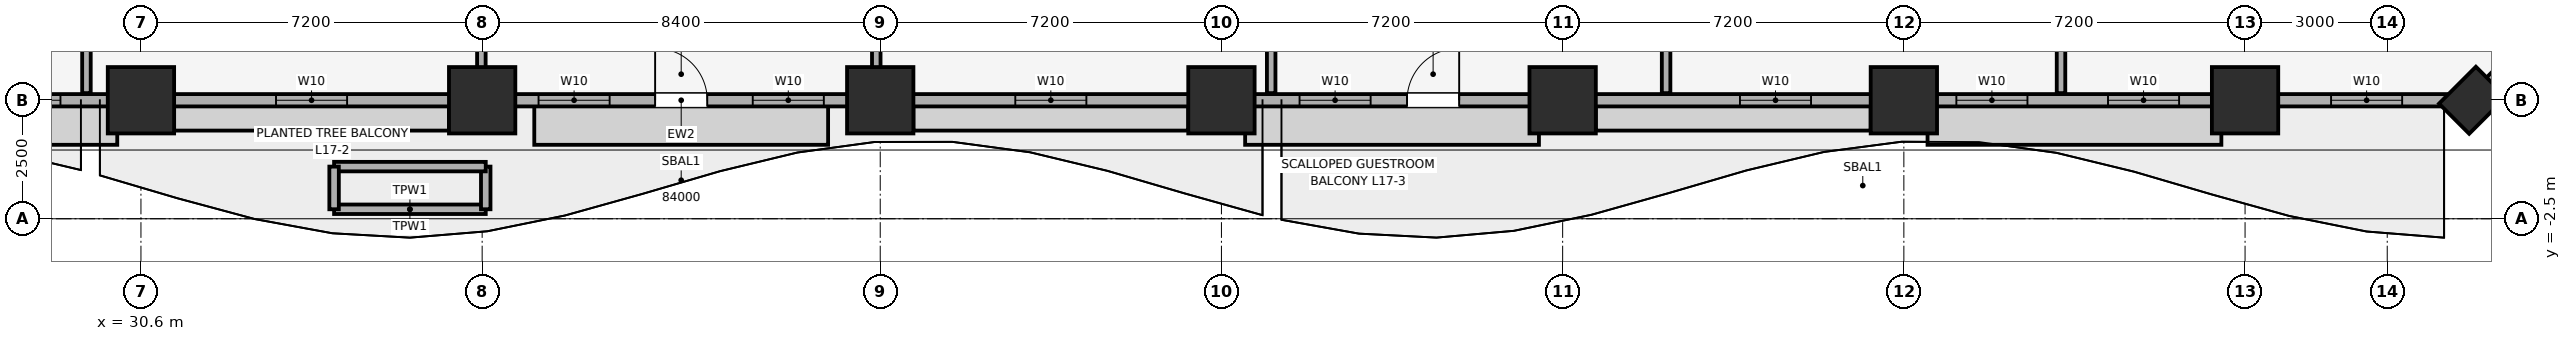
"""IFC4 building model, lengths in metres.
Left out: names, types, materials, properties, quantities, classifications, styles, units other than length and angle.
Written with IfcOpenShell. Run it as: python <this file> out.ifc"""

import sys

from ifc_helpers import new_model, si_unit, direction, frame, frame_2d, origin, origin_2d, place, context, subcontext, project, spatial, rectangle, extrude, element, fill, save


model = new_model("IFC4")
c1 = context("Model", 3, precision=1e-05, world=origin(), true_north=direction((0.0, 1.0)))
c2 = subcontext(c1, "Body", "Model", "MODEL_VIEW")
j1 = project(units=[si_unit("LENGTHUNIT", "METRE"), si_unit("PLANEANGLEUNIT", "RADIAN")], contexts=[c1])
p1 = place(None, origin())
s1 = spatial("IfcSite", under=j1, at=p1, CompositionType="ELEMENT")
p2 = place(p1, origin())
s2 = spatial("IfcBuilding", under=s1, at=p2, CompositionType="ELEMENT")
p3 = place(p2, frame((0.0, 0.0, 76.4)))
s3 = spatial("IfcBuildingStorey", under=s2, at=p3, CompositionType="ELEMENT", Elevation=76.4)
for number, where, z_axis, x_axis in (
    (1, (30.6, 0.0, 0.0), (0.0, 0.0, 1.0), (1.0, 0.0, 0.0)),
    (2, (37.8, 0.0, 0.0), (0.0, 0.0, 1.0), (1.0, 0.0, 0.0)),
    (3, (46.2, 0.0, 0.0), (0.0, 0.0, 1.0), (1.0, 0.0, 0.0)),
    (4, (53.4, 0.0, 0.0), (0.0, 0.0, 1.0), (1.0, 0.0, 0.0)),
    (5, (60.6, 0.0, 0.0), (0.0, 0.0, 1.0), (1.0, 0.0, 0.0)),
    (6, (67.8, 0.0, 0.0), (0.0, 0.0, 1.0), (1.0, 0.0, 0.0)),
    (7, (75.0, 0.0, 0.0), (0.0, 0.0, 1.0), (1.0, 0.0, 0.0)),
):
    element("IfcColumn", number, at=place(p3, frame(where, z_axis=z_axis, x_axis=x_axis)), inside=s3, PredefinedType="COLUMN", context=c2, shape_type="SweptSolid", body=[
        extrude(rectangle(XDim=1.4, YDim=1.4, at=origin_2d()), origin(), (0.0, 0.0, 1.0), 3.4),
    ])
p4 = place(p3, frame((79.8, 0.0, 0.0), z_axis=(0.0, 0.0, 1.0), x_axis=(0.707106781187, 0.707106781187, 0.0)))
e8 = element("IfcColumn", 8, at=p4, inside=s3, PredefinedType="PILASTER", context=c2, shape_type="SweptSolid", body=[
    extrude(rectangle(XDim=1.1, YDim=0.9, at=origin_2d()), origin(), (0.0, 0.0, 1.0), 3.4),
])
p5 = place(p3, frame((4.2, 0.0, 0.0), z_axis=(0.0, 0.0, 1.0), x_axis=(1.0, 0.0, 0.0)))
e9 = element("IfcWall", 9, at=p5, inside=s3, PredefinedType="SOLIDWALL", context=c2, shape_type="SweptSolid", body=[
    extrude(rectangle(XDim=75.6, YDim=0.26, at=frame_2d((37.8, 0.0))), origin(), (0.0, 0.0, 1.0), 2.45),
])
p6 = place(p5, frame((21.383, 0.0, 0.0)))
e10 = element("IfcOpeningElement", 10, at=p6, cuts=e9, PredefinedType="OPENING", context=c2, shape_type="SweptSolid", body=[
    extrude(rectangle(XDim=1.1, YDim=2.15, at=frame_2d((0.55, 1.075))), frame((0.0, 0.14, 0.0), z_axis=(0.0, -1.0, 0.0), x_axis=(1.0, 0.0, 0.0)), (0.0, 0.0, 1.0), 0.28),
])
p7 = place(p5, frame((37.25, 0.0, 0.0)))
e11 = element("IfcOpeningElement", 11, at=p7, cuts=e9, PredefinedType="OPENING", context=c2, shape_type="SweptSolid", body=[
    extrude(rectangle(XDim=1.1, YDim=2.15, at=frame_2d((0.55, 1.075))), frame((0.0, 0.14, 0.0), z_axis=(0.0, -1.0, 0.0), x_axis=(1.0, 0.0, 0.0)), (0.0, 0.0, 1.0), 0.28),
])
p8 = place(p5, frame((53.117, 0.0, 0.0)))
e12 = element("IfcOpeningElement", 12, at=p8, cuts=e9, PredefinedType="OPENING", context=c2, shape_type="SweptSolid", body=[
    extrude(rectangle(XDim=1.1, YDim=2.15, at=frame_2d((0.55, 1.075))), frame((0.0, 0.14, 0.0), z_axis=(0.0, -1.0, 0.0), x_axis=(1.0, 0.0, 0.0)), (0.0, 0.0, 1.0), 0.28),
])
p9 = place(p5, frame((1.485, 0.0, 0.85)))
e13 = element("IfcOpeningElement", 13, at=p9, cuts=e9, PredefinedType="OPENING", context=c2, shape_type="SweptSolid", body=[
    extrude(rectangle(XDim=1.5, YDim=1.4, at=frame_2d((0.75, 0.7))), frame((0.0, 0.14, 0.0), z_axis=(0.0, -1.0, 0.0), x_axis=(1.0, 0.0, 0.0)), (0.0, 0.0, 1.0), 0.28),
])
p10 = place(p5, frame((6.142, 0.0, 0.85)))
e14 = element("IfcOpeningElement", 14, at=p10, cuts=e9, PredefinedType="OPENING", context=c2, shape_type="SweptSolid", body=[
    extrude(rectangle(XDim=1.5, YDim=1.4, at=frame_2d((0.75, 0.7))), frame((0.0, 0.14, 0.0), z_axis=(0.0, -1.0, 0.0), x_axis=(1.0, 0.0, 0.0)), (0.0, 0.0, 1.0), 0.28),
])
p11 = place(p5, frame((9.342, 0.0, 0.85)))
e15 = element("IfcOpeningElement", 15, at=p11, cuts=e9, PredefinedType="OPENING", context=c2, shape_type="SweptSolid", body=[
    extrude(rectangle(XDim=1.5, YDim=1.4, at=frame_2d((0.75, 0.7))), frame((0.0, 0.14, 0.0), z_axis=(0.0, -1.0, 0.0), x_axis=(1.0, 0.0, 0.0)), (0.0, 0.0, 1.0), 0.28),
])
p12 = place(p5, frame((13.908, 0.0, 0.85)))
e16 = element("IfcOpeningElement", 16, at=p12, cuts=e9, PredefinedType="OPENING", context=c2, shape_type="SweptSolid", body=[
    extrude(rectangle(XDim=1.5, YDim=1.4, at=frame_2d((0.75, 0.7))), frame((0.0, 0.14, 0.0), z_axis=(0.0, -1.0, 0.0), x_axis=(1.0, 0.0, 0.0)), (0.0, 0.0, 1.0), 0.28),
])
p13 = place(p5, frame((23.202, 0.0, 0.85)))
e17 = element("IfcOpeningElement", 17, at=p13, cuts=e9, PredefinedType="OPENING", context=c2, shape_type="SweptSolid", body=[
    extrude(rectangle(XDim=1.5, YDim=1.4, at=frame_2d((0.75, 0.7))), frame((0.0, 0.14, 0.0), z_axis=(0.0, -1.0, 0.0), x_axis=(1.0, 0.0, 0.0)), (0.0, 0.0, 1.0), 0.28),
])
p14 = place(p5, frame((29.25, 0.0, 0.85)))
e18 = element("IfcOpeningElement", 18, at=p14, cuts=e9, PredefinedType="OPENING", context=c2, shape_type="SweptSolid", body=[
    extrude(rectangle(XDim=1.5, YDim=1.4, at=frame_2d((0.75, 0.7))), frame((0.0, 0.14, 0.0), z_axis=(0.0, -1.0, 0.0), x_axis=(1.0, 0.0, 0.0)), (0.0, 0.0, 1.0), 0.28),
])
p15 = place(p5, frame((34.79, 0.0, 0.85)))
e19 = element("IfcOpeningElement", 19, at=p15, cuts=e9, PredefinedType="OPENING", context=c2, shape_type="SweptSolid", body=[
    extrude(rectangle(XDim=1.5, YDim=1.4, at=frame_2d((0.75, 0.7))), frame((0.0, 0.14, 0.0), z_axis=(0.0, -1.0, 0.0), x_axis=(1.0, 0.0, 0.0)), (0.0, 0.0, 1.0), 0.28),
])
p16 = place(p5, frame((39.31, 0.0, 0.85)))
e20 = element("IfcOpeningElement", 20, at=p16, cuts=e9, PredefinedType="OPENING", context=c2, shape_type="SweptSolid", body=[
    extrude(rectangle(XDim=1.5, YDim=1.4, at=frame_2d((0.75, 0.7))), frame((0.0, 0.14, 0.0), z_axis=(0.0, -1.0, 0.0), x_axis=(1.0, 0.0, 0.0)), (0.0, 0.0, 1.0), 0.28),
])
p17 = place(p5, frame((44.85, 0.0, 0.85)))
e21 = element("IfcOpeningElement", 21, at=p17, cuts=e9, PredefinedType="OPENING", context=c2, shape_type="SweptSolid", body=[
    extrude(rectangle(XDim=1.5, YDim=1.4, at=frame_2d((0.75, 0.7))), frame((0.0, 0.14, 0.0), z_axis=(0.0, -1.0, 0.0), x_axis=(1.0, 0.0, 0.0)), (0.0, 0.0, 1.0), 0.28),
])
p18 = place(p5, frame((50.848, 0.0, 0.85)))
e22 = element("IfcOpeningElement", 22, at=p18, cuts=e9, PredefinedType="OPENING", context=c2, shape_type="SweptSolid", body=[
    extrude(rectangle(XDim=1.5, YDim=1.4, at=frame_2d((0.75, 0.7))), frame((0.0, 0.14, 0.0), z_axis=(0.0, -1.0, 0.0), x_axis=(1.0, 0.0, 0.0)), (0.0, 0.0, 1.0), 0.28),
])
p19 = place(p5, frame((60.142, 0.0, 0.85)))
e23 = element("IfcOpeningElement", 23, at=p19, cuts=e9, PredefinedType="OPENING", context=c2, shape_type="SweptSolid", body=[
    extrude(rectangle(XDim=1.5, YDim=1.4, at=frame_2d((0.75, 0.7))), frame((0.0, 0.14, 0.0), z_axis=(0.0, -1.0, 0.0), x_axis=(1.0, 0.0, 0.0)), (0.0, 0.0, 1.0), 0.28),
])
p20 = place(p5, frame((64.708, 0.0, 0.85)))
e24 = element("IfcOpeningElement", 24, at=p20, cuts=e9, PredefinedType="OPENING", context=c2, shape_type="SweptSolid", body=[
    extrude(rectangle(XDim=1.5, YDim=1.4, at=frame_2d((0.75, 0.7))), frame((0.0, 0.14, 0.0), z_axis=(0.0, -1.0, 0.0), x_axis=(1.0, 0.0, 0.0)), (0.0, 0.0, 1.0), 0.28),
])
p21 = place(p5, frame((67.908, 0.0, 0.85)))
e25 = element("IfcOpeningElement", 25, at=p21, cuts=e9, PredefinedType="OPENING", context=c2, shape_type="SweptSolid", body=[
    extrude(rectangle(XDim=1.5, YDim=1.4, at=frame_2d((0.75, 0.7))), frame((0.0, 0.14, 0.0), z_axis=(0.0, -1.0, 0.0), x_axis=(1.0, 0.0, 0.0)), (0.0, 0.0, 1.0), 0.28),
])
p22 = place(p5, frame((72.615, 0.0, 0.85)))
e26 = element("IfcOpeningElement", 26, at=p22, cuts=e9, PredefinedType="OPENING", context=c2, shape_type="SweptSolid", body=[
    extrude(rectangle(XDim=1.5, YDim=1.4, at=frame_2d((0.75, 0.7))), frame((0.0, 0.14, 0.0), z_axis=(0.0, -1.0, 0.0), x_axis=(1.0, 0.0, 0.0)), (0.0, 0.0, 1.0), 0.28),
])
p23 = place(p3, frame((79.8, 0.0, 0.0), z_axis=(0.0, 0.0, 1.0), x_axis=(0.707106781187, 0.707106781187, 0.0)))
e27 = element("IfcWall", 27, at=p23, inside=s3, PredefinedType="SOLIDWALL", context=c2, shape_type="SweptSolid", body=[
    extrude(rectangle(XDim=5.94, YDim=0.26, at=frame_2d((2.97, 0.0))), origin(), (0.0, 0.0, 1.0), 2.45),
])
p24 = place(p3, frame((34.676, -2.3, 0.0), z_axis=(0.0, 0.0, 1.0), x_axis=(1.0, 0.0, 0.0)))
e28 = element("IfcWall", 28, at=p24, inside=s3, PredefinedType="PARAPET", context=c2, shape_type="SweptSolid", body=[
    extrude(rectangle(XDim=3.2, YDim=0.2, at=frame_2d((1.6, 0.0))), origin(), (0.0, 0.0, 1.0), 0.55),
])
p25 = place(p3, frame((37.875, -2.3, 0.0), z_axis=(0.0, 0.0, 1.0), x_axis=(0.0, 1.0, 0.0)))
e29 = element("IfcWall", 29, at=p25, inside=s3, PredefinedType="PARAPET", context=c2, shape_type="SweptSolid", body=[
    extrude(rectangle(XDim=0.9, YDim=0.2, at=frame_2d((0.45, 0.0))), origin(), (0.0, 0.0, 1.0), 0.55),
])
p26 = place(p3, frame((37.875, -1.4, 0.0), z_axis=(0.0, 0.0, 1.0), x_axis=(-1.0, 0.0, 0.0)))
e30 = element("IfcWall", 30, at=p26, inside=s3, PredefinedType="PARAPET", context=c2, shape_type="SweptSolid", body=[
    extrude(rectangle(XDim=3.2, YDim=0.2, at=frame_2d((1.6, 0.0))), origin(), (0.0, 0.0, 1.0), 0.55),
])
p27 = place(p3, frame((34.676, -1.4, 0.0), z_axis=(0.0, 0.0, 1.0), x_axis=(0.0, -1.0, 0.0)))
e31 = element("IfcWall", 31, at=p27, inside=s3, PredefinedType="PARAPET", context=c2, shape_type="SweptSolid", body=[
    extrude(rectangle(XDim=0.9, YDim=0.2, at=frame_2d((0.45, 0.0))), origin(), (0.0, 0.0, 1.0), 0.55),
])
p28 = place(p3, frame((29.45, 0.15, 0.0), z_axis=(0.0, 0.0, 1.0), x_axis=(0.0, 1.0, 0.0)))
e32 = element("IfcWall", 32, at=p28, inside=s3, PredefinedType="PARTITIONING", context=c2, shape_type="SweptSolid", body=[
    extrude(rectangle(XDim=18.955, YDim=0.18, at=frame_2d((9.478, 0.0))), origin(), (0.0, 0.0, 1.0), 3.4),
])
for number, where, z_axis, x_axis in (
    (33, (37.783, 0.15, 0.0), (0.0, 0.0, 1.0), (0.0, 1.0, 0.0)),
    (34, (46.116, 0.15, 0.0), (0.0, 0.0, 1.0), (0.0, 1.0, 0.0)),
):
    element("IfcWall", number, at=place(p3, frame(where, z_axis=z_axis, x_axis=x_axis)), inside=s3, PredefinedType="PARTITIONING", context=c2, shape_type="SweptSolid", body=[
        extrude(rectangle(XDim=18.955, YDim=0.18, at=frame_2d((9.478, 0.0))), origin(), (0.0, 0.0, 1.0), 2.8),
    ])
for number, where, z_axis, x_axis in (
    (35, (54.45, 0.15, 0.0), (0.0, 0.0, 1.0), (0.0, 1.0, 0.0)),
    (36, (62.783, 0.15, 0.0), (0.0, 0.0, 1.0), (0.0, 1.0, 0.0)),
    (37, (71.116, 0.15, 0.0), (0.0, 0.0, 1.0), (0.0, 1.0, 0.0)),
):
    element("IfcWall", number, at=place(p3, frame(where, z_axis=z_axis, x_axis=x_axis)), inside=s3, PredefinedType="PARTITIONING", context=c2, shape_type="SweptSolid", body=[
        extrude(rectangle(XDim=18.955, YDim=0.18, at=frame_2d((9.478, 0.0))), origin(), (0.0, 0.0, 1.0), 3.4),
    ])
p29 = place(p7, origin())
e38 = element("IfcDoor", 38, at=p29, inside=s3, OperationType="SINGLE_SWING_LEFT", PredefinedType="DOOR", context=c2, shape_type="SweptSolid", body=[
    extrude(rectangle(XDim=1.1, YDim=2.15, at=frame_2d((0.55, 1.075))), frame((0.0, 0.025, 0.0), z_axis=(0.0, -1.0, 0.0), x_axis=(1.0, 0.0, 0.0)), (0.0, 0.0, 1.0), 0.05),
])
fill(e11, e38)
p30 = place(p8, origin())
e39 = element("IfcDoor", 39, at=p30, inside=s3, OperationType="SINGLE_SWING_RIGHT", PredefinedType="DOOR", context=c2, shape_type="SweptSolid", body=[
    extrude(rectangle(XDim=1.1, YDim=2.15, at=frame_2d((0.55, 1.075))), frame((0.0, 0.025, 0.0), z_axis=(0.0, -1.0, 0.0), x_axis=(1.0, 0.0, 0.0)), (0.0, 0.0, 1.0), 0.05),
])
fill(e12, e39)
p31 = place(p13, origin())
e40 = element("IfcWindow", 40, at=p31, inside=s3, PartitioningType="SINGLE_PANEL", PredefinedType="WINDOW", context=c2, shape_type="SweptSolid", body=[
    extrude(rectangle(XDim=1.5, YDim=1.4, at=frame_2d((0.75, 0.7))), frame((0.0, 0.03, 0.0), z_axis=(0.0, -1.0, 0.0), x_axis=(1.0, 0.0, 0.0)), (0.0, 0.0, 1.0), 0.06),
])
fill(e17, e40)
p32 = place(p14, origin())
e41 = element("IfcWindow", 41, at=p32, inside=s3, PartitioningType="SINGLE_PANEL", PredefinedType="WINDOW", context=c2, shape_type="SweptSolid", body=[
    extrude(rectangle(XDim=1.5, YDim=1.4, at=frame_2d((0.75, 0.7))), frame((0.0, 0.03, 0.0), z_axis=(0.0, -1.0, 0.0), x_axis=(1.0, 0.0, 0.0)), (0.0, 0.0, 1.0), 0.06),
])
fill(e18, e41)
p33 = place(p15, origin())
e42 = element("IfcWindow", 42, at=p33, inside=s3, PartitioningType="SINGLE_PANEL", PredefinedType="WINDOW", context=c2, shape_type="SweptSolid", body=[
    extrude(rectangle(XDim=1.5, YDim=1.4, at=frame_2d((0.75, 0.7))), frame((0.0, 0.03, 0.0), z_axis=(0.0, -1.0, 0.0), x_axis=(1.0, 0.0, 0.0)), (0.0, 0.0, 1.0), 0.06),
])
fill(e19, e42)
p34 = place(p16, origin())
e43 = element("IfcWindow", 43, at=p34, inside=s3, PartitioningType="SINGLE_PANEL", PredefinedType="WINDOW", context=c2, shape_type="SweptSolid", body=[
    extrude(rectangle(XDim=1.5, YDim=1.4, at=frame_2d((0.75, 0.7))), frame((0.0, 0.03, 0.0), z_axis=(0.0, -1.0, 0.0), x_axis=(1.0, 0.0, 0.0)), (0.0, 0.0, 1.0), 0.06),
])
fill(e20, e43)
p35 = place(p17, origin())
e44 = element("IfcWindow", 44, at=p35, inside=s3, PartitioningType="SINGLE_PANEL", PredefinedType="WINDOW", context=c2, shape_type="SweptSolid", body=[
    extrude(rectangle(XDim=1.5, YDim=1.4, at=frame_2d((0.75, 0.7))), frame((0.0, 0.03, 0.0), z_axis=(0.0, -1.0, 0.0), x_axis=(1.0, 0.0, 0.0)), (0.0, 0.0, 1.0), 0.06),
])
fill(e21, e44)
p36 = place(p18, origin())
e45 = element("IfcWindow", 45, at=p36, inside=s3, PartitioningType="SINGLE_PANEL", PredefinedType="WINDOW", context=c2, shape_type="SweptSolid", body=[
    extrude(rectangle(XDim=1.5, YDim=1.4, at=frame_2d((0.75, 0.7))), frame((0.0, 0.03, 0.0), z_axis=(0.0, -1.0, 0.0), x_axis=(1.0, 0.0, 0.0)), (0.0, 0.0, 1.0), 0.06),
])
fill(e22, e45)
p37 = place(p19, origin())
e46 = element("IfcWindow", 46, at=p37, inside=s3, PartitioningType="SINGLE_PANEL", PredefinedType="WINDOW", context=c2, shape_type="SweptSolid", body=[
    extrude(rectangle(XDim=1.5, YDim=1.4, at=frame_2d((0.75, 0.7))), frame((0.0, 0.03, 0.0), z_axis=(0.0, -1.0, 0.0), x_axis=(1.0, 0.0, 0.0)), (0.0, 0.0, 1.0), 0.06),
])
fill(e23, e46)
p38 = place(p20, origin())
e47 = element("IfcWindow", 47, at=p38, inside=s3, PartitioningType="SINGLE_PANEL", PredefinedType="WINDOW", context=c2, shape_type="SweptSolid", body=[
    extrude(rectangle(XDim=1.5, YDim=1.4, at=frame_2d((0.75, 0.7))), frame((0.0, 0.03, 0.0), z_axis=(0.0, -1.0, 0.0), x_axis=(1.0, 0.0, 0.0)), (0.0, 0.0, 1.0), 0.06),
])
fill(e24, e47)
p39 = place(p21, origin())
e48 = element("IfcWindow", 48, at=p39, inside=s3, PartitioningType="SINGLE_PANEL", PredefinedType="WINDOW", context=c2, shape_type="SweptSolid", body=[
    extrude(rectangle(XDim=1.5, YDim=1.4, at=frame_2d((0.75, 0.7))), frame((0.0, 0.03, 0.0), z_axis=(0.0, -1.0, 0.0), x_axis=(1.0, 0.0, 0.0)), (0.0, 0.0, 1.0), 0.06),
])
fill(e25, e48)
p40 = place(p22, origin())
e49 = element("IfcWindow", 49, at=p40, inside=s3, PartitioningType="SINGLE_PANEL", PredefinedType="WINDOW", context=c2, shape_type="SweptSolid", body=[
    extrude(rectangle(XDim=1.5, YDim=1.4, at=frame_2d((0.75, 0.7))), frame((0.0, 0.03, 0.0), z_axis=(0.0, -1.0, 0.0), x_axis=(1.0, 0.0, 0.0)), (0.0, 0.0, 1.0), 0.06),
])
fill(e26, e49)
save(model, sys.argv[1])
